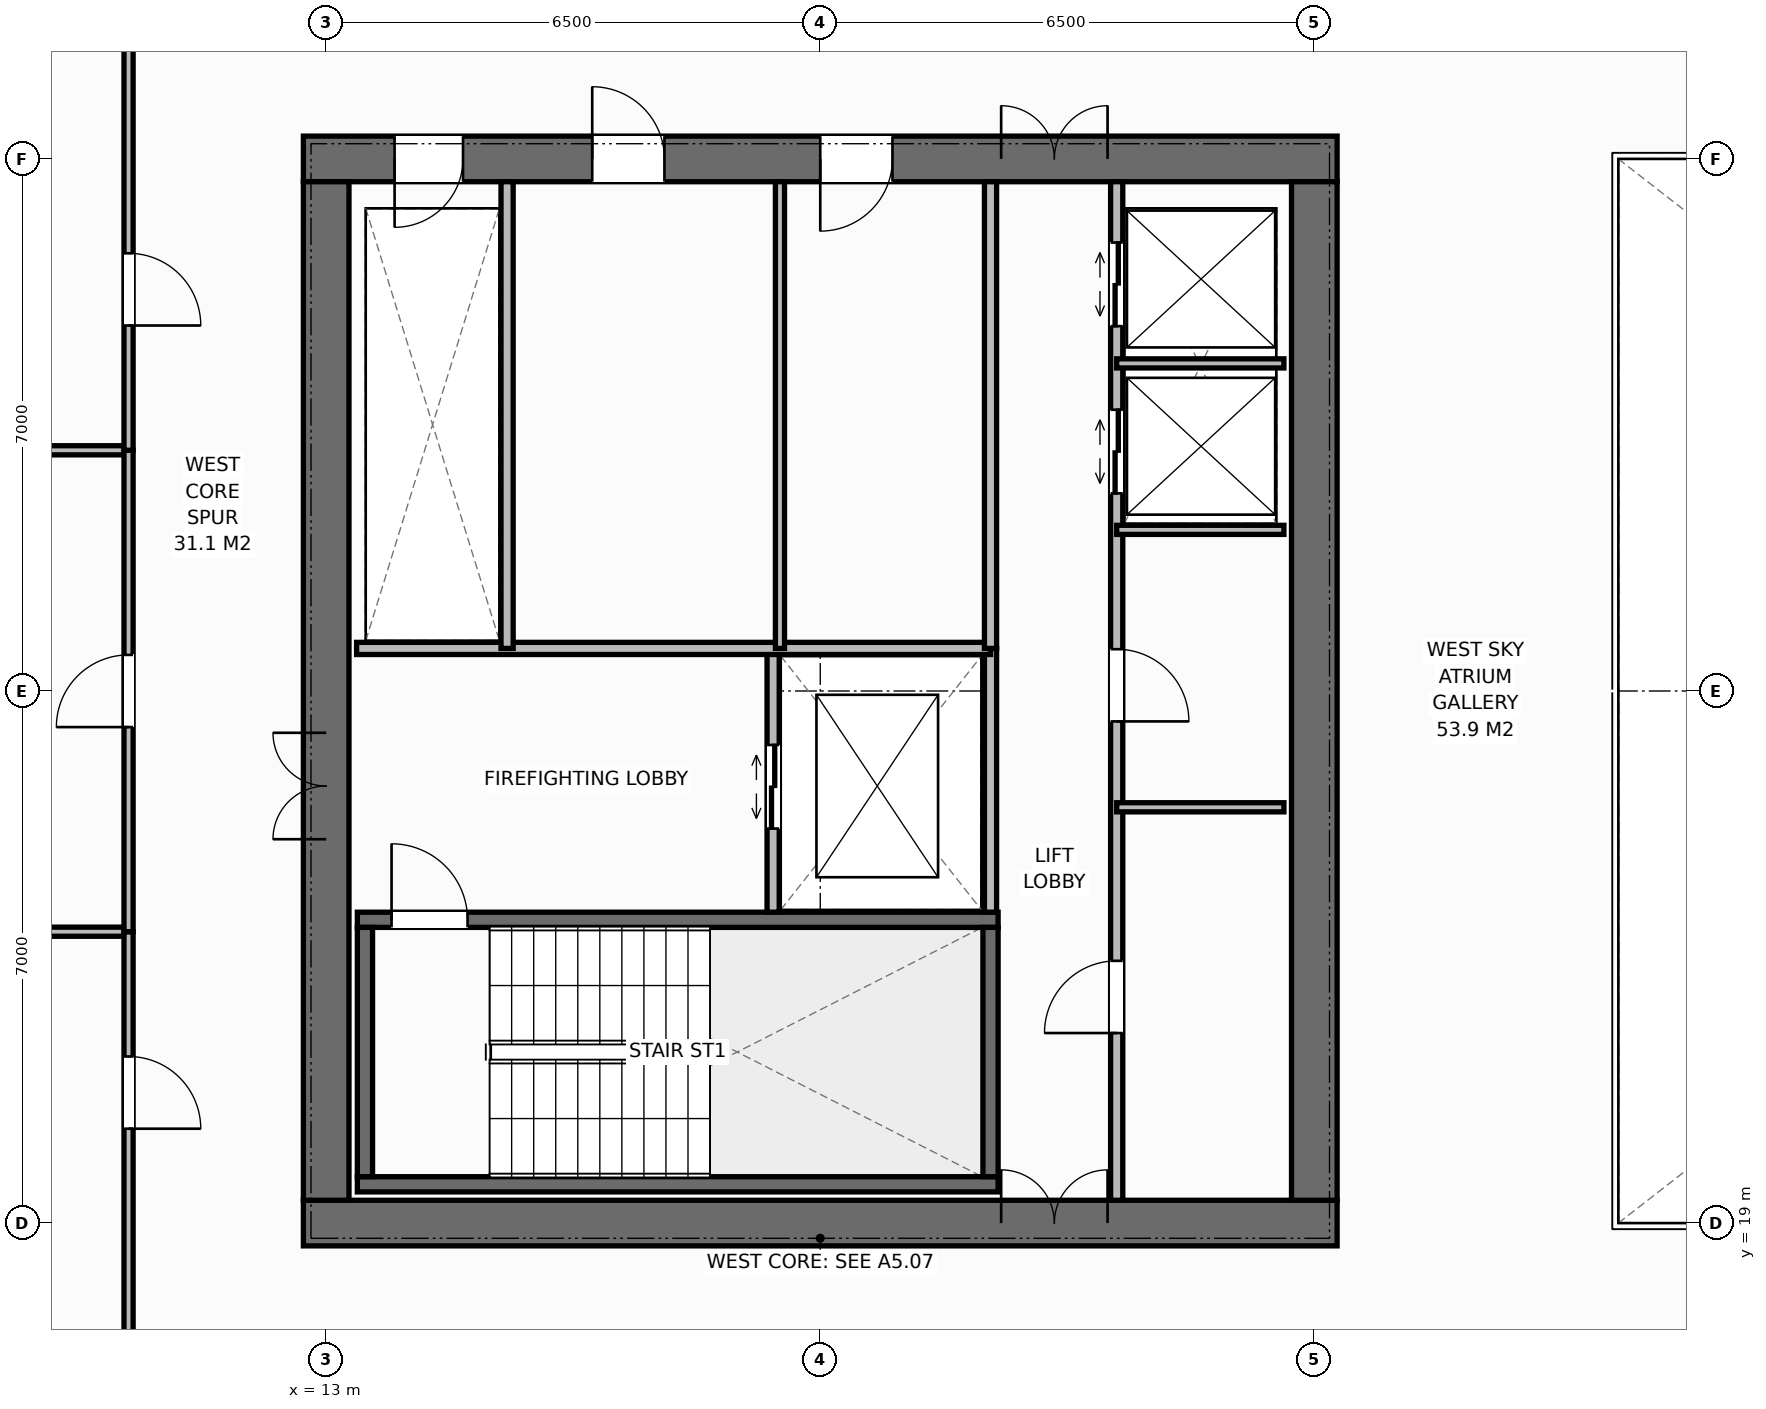
"""IFC4 building model, lengths in metres.
Left out: names, types, materials, properties, quantities, classifications, styles, units other than length and angle.
Written with IfcOpenShell. Run it as: python <this file> out.ifc"""

import sys

from ifc_helpers import new_model, si_unit, direction, frame, frame_2d, origin, place, context, subcontext, project, spatial, rectangle, extrude, element, fill, save


model = new_model("IFC4")
c1 = context("Model", 3, precision=1e-05, world=origin(), true_north=direction((0.0, 1.0)))
c2 = subcontext(c1, "Body", "Model", "MODEL_VIEW")
j1 = project(units=[si_unit("LENGTHUNIT", "METRE"), si_unit("PLANEANGLEUNIT", "RADIAN")], contexts=[c1])
p1 = place(None, origin())
s1 = spatial("IfcSite", under=j1, at=p1, CompositionType="ELEMENT")
p2 = place(p1, origin())
s2 = spatial("IfcBuilding", under=s1, at=p2, CompositionType="ELEMENT")
p3 = place(p2, frame((0.0, 0.0, 193.6)))
s3 = spatial("IfcBuildingStorey", under=s2, at=p3, CompositionType="ELEMENT", Elevation=193.6)
p4 = place(p3, frame((12.7, 19.0, 0.0), z_axis=(0.0, 0.0, 1.0), x_axis=(1.0, 0.0, 0.0)))
e1 = element("IfcWall", 1, at=p4, inside=s3, PredefinedType="SHEAR", context=c2, shape_type="SweptSolid", body=[
    extrude(rectangle(XDim=13.6, YDim=0.6, at=frame_2d((6.8, 0.0))), origin(), (0.0, 0.0, 1.0), 3.8),
])
p5 = place(p4, frame((9.18, 0.0, 0.0)))
e2 = element("IfcOpeningElement", 2, at=p5, cuts=e1, PredefinedType="OPENING", context=c2, shape_type="SweptSolid", body=[
    extrude(rectangle(XDim=1.4, YDim=2.2, at=frame_2d((0.7, 1.1))), frame((0.0, 0.31, 0.0), z_axis=(0.0, -1.0, 0.0), x_axis=(1.0, 0.0, 0.0)), (0.0, 0.0, 1.0), 0.62),
])
p6 = place(p3, frame((12.7, 33.0, 0.0), z_axis=(0.0, 0.0, 1.0), x_axis=(1.0, 0.0, 0.0)))
e3 = element("IfcWall", 3, at=p6, inside=s3, PredefinedType="SHEAR", context=c2, shape_type="SweptSolid", body=[
    extrude(rectangle(XDim=13.6, YDim=0.6, at=frame_2d((6.8, 0.0))), origin(), (0.0, 0.0, 1.0), 3.8),
])
p7 = place(p6, frame((1.2, 0.0, 0.0)))
e4 = element("IfcOpeningElement", 4, at=p7, cuts=e3, PredefinedType="OPENING", context=c2, shape_type="SweptSolid", body=[
    extrude(rectangle(XDim=0.9, YDim=2.15, at=frame_2d((0.45, 1.075))), frame((0.0, 0.31, 0.0), z_axis=(0.0, -1.0, 0.0), x_axis=(1.0, 0.0, 0.0)), (0.0, 0.0, 1.0), 0.62),
])
p8 = place(p6, frame((3.8, 0.0, 0.0)))
e5 = element("IfcOpeningElement", 5, at=p8, cuts=e3, PredefinedType="OPENING", context=c2, shape_type="SweptSolid", body=[
    extrude(rectangle(XDim=0.95, YDim=2.15, at=frame_2d((0.475, 1.075))), frame((0.0, 0.31, 0.0), z_axis=(0.0, -1.0, 0.0), x_axis=(1.0, 0.0, 0.0)), (0.0, 0.0, 1.0), 0.62),
])
p9 = place(p6, frame((6.8, 0.0, 0.0)))
e6 = element("IfcOpeningElement", 6, at=p9, cuts=e3, PredefinedType="OPENING", context=c2, shape_type="SweptSolid", body=[
    extrude(rectangle(XDim=0.95, YDim=2.15, at=frame_2d((0.475, 1.075))), frame((0.0, 0.31, 0.0), z_axis=(0.0, -1.0, 0.0), x_axis=(1.0, 0.0, 0.0)), (0.0, 0.0, 1.0), 0.62),
])
p10 = place(p6, frame((9.18, 0.0, 0.0)))
e7 = element("IfcOpeningElement", 7, at=p10, cuts=e3, PredefinedType="OPENING", context=c2, shape_type="SweptSolid", body=[
    extrude(rectangle(XDim=1.4, YDim=2.2, at=frame_2d((0.7, 1.1))), frame((0.0, 0.31, 0.0), z_axis=(0.0, -1.0, 0.0), x_axis=(1.0, 0.0, 0.0)), (0.0, 0.0, 1.0), 0.62),
])
p11 = place(p3, frame((13.0, 19.3, 0.0), z_axis=(0.0, 0.0, 1.0), x_axis=(0.0, 1.0, 0.0)))
e8 = element("IfcWall", 8, at=p11, inside=s3, PredefinedType="SHEAR", context=c2, shape_type="SweptSolid", body=[
    extrude(rectangle(XDim=13.4, YDim=0.6, at=frame_2d((6.7, 0.0))), origin(), (0.0, 0.0, 1.0), 3.8),
])
p12 = place(p11, frame((4.75, 0.0, 0.0)))
e9 = element("IfcOpeningElement", 9, at=p12, cuts=e8, PredefinedType="OPENING", context=c2, shape_type="SweptSolid", body=[
    extrude(rectangle(XDim=1.4, YDim=2.2, at=frame_2d((0.7, 1.1))), frame((0.0, 0.31, 0.0), z_axis=(0.0, -1.0, 0.0), x_axis=(1.0, 0.0, 0.0)), (0.0, 0.0, 1.0), 0.62),
])
p13 = place(p3, frame((26.0, 19.3, 0.0), z_axis=(0.0, 0.0, 1.0), x_axis=(0.0, 1.0, 0.0)))
e10 = element("IfcWall", 10, at=p13, inside=s3, PredefinedType="SHEAR", context=c2, shape_type="SweptSolid", body=[
    extrude(rectangle(XDim=13.4, YDim=0.6, at=frame_2d((6.7, 0.0))), origin(), (0.0, 0.0, 1.0), 3.8),
])
p14 = place(p3, frame((13.41, 19.51, 0.0), z_axis=(0.0, 0.0, 1.0), x_axis=(1.0, 0.0, 0.0)))
e11 = element("IfcWall", 11, at=p14, inside=s3, PredefinedType="SHEAR", context=c2, shape_type="SweptSolid", body=[
    extrude(rectangle(XDim=8.43, YDim=0.2, at=frame_2d((4.215, 0.0))), origin(), (0.0, 0.0, 1.0), 3.8),
])
p15 = place(p3, frame((13.41, 22.99, 0.0), z_axis=(0.0, 0.0, 1.0), x_axis=(1.0, 0.0, 0.0)))
e12 = element("IfcWall", 12, at=p15, inside=s3, PredefinedType="SHEAR", context=c2, shape_type="SweptSolid", body=[
    extrude(rectangle(XDim=8.43, YDim=0.2, at=frame_2d((4.215, 0.0))), origin(), (0.0, 0.0, 1.0), 3.8),
])
p16 = place(p15, frame((0.45, 0.0, 0.0)))
e13 = element("IfcOpeningElement", 13, at=p16, cuts=e12, PredefinedType="OPENING", context=c2, shape_type="SweptSolid", body=[
    extrude(rectangle(XDim=1.0, YDim=2.15, at=frame_2d((0.5, 1.075))), frame((0.0, 0.11, 0.0), z_axis=(0.0, -1.0, 0.0), x_axis=(1.0, 0.0, 0.0)), (0.0, 0.0, 1.0), 0.22),
])
for number, where, z_axis, x_axis in (
    (14, (13.51, 19.61, 0.0), (0.0, 0.0, 1.0), (0.0, 1.0, 0.0)),
    (15, (21.74, 19.61, 0.0), (0.0, 0.0, 1.0), (0.0, 1.0, 0.0)),
):
    element("IfcWall", number, at=place(p3, frame(where, z_axis=z_axis, x_axis=x_axis)), inside=s3, PredefinedType="SHEAR", context=c2, shape_type="SweptSolid", body=[
        extrude(rectangle(XDim=3.28, YDim=0.2, at=frame_2d((1.64, 0.0))), origin(), (0.0, 0.0, 1.0), 3.8),
    ])
p17 = place(p3, frame((21.74, 23.09, 0.0), z_axis=(0.0, 0.0, 1.0), x_axis=(0.0, 1.0, 0.0)))
e16 = element("IfcWall", 16, at=p17, inside=s3, PredefinedType="STANDARD", context=c2, shape_type="SweptSolid", body=[
    extrude(rectangle(XDim=3.47, YDim=0.16, at=frame_2d((1.735, 0.0))), origin(), (0.0, 0.0, 1.0), 3.52),
])
p18 = place(p3, frame((18.88, 23.09, 0.0), z_axis=(0.0, 0.0, 1.0), x_axis=(0.0, 1.0, 0.0)))
e17 = element("IfcWall", 17, at=p18, inside=s3, PredefinedType="STANDARD", context=c2, shape_type="SweptSolid", body=[
    extrude(rectangle(XDim=3.47, YDim=0.16, at=frame_2d((1.735, 0.0))), origin(), (0.0, 0.0, 1.0), 3.52),
])
p19 = place(p18, frame((1.1, 0.0, 0.0)))
e18 = element("IfcOpeningElement", 18, at=p19, cuts=e17, PredefinedType="OPENING", context=c2, shape_type="SweptSolid", body=[
    extrude(rectangle(XDim=1.1, YDim=2.2, at=frame_2d((0.55, 1.1))), frame((0.0, 0.09, 0.0), z_axis=(0.0, -1.0, 0.0), x_axis=(1.0, 0.0, 0.0)), (0.0, 0.0, 1.0), 0.18),
])
p20 = place(p3, frame((13.4, 26.56, 0.0), z_axis=(0.0, 0.0, 1.0), x_axis=(1.0, 0.0, 0.0)))
e19 = element("IfcWall", 19, at=p20, inside=s3, PredefinedType="STANDARD", context=c2, shape_type="SweptSolid", body=[
    extrude(rectangle(XDim=8.34, YDim=0.16, at=frame_2d((4.17, 0.0))), origin(), (0.0, 0.0, 1.0), 3.52),
])
p21 = place(p3, frame((15.38, 26.56, 0.0), z_axis=(0.0, 0.0, 1.0), x_axis=(0.0, 1.0, 0.0)))
e20 = element("IfcWall", 20, at=p21, inside=s3, PredefinedType="STANDARD", context=c2, shape_type="SweptSolid", body=[
    extrude(rectangle(XDim=6.14, YDim=0.16, at=frame_2d((3.07, 0.0))), origin(), (0.0, 0.0, 1.0), 3.52),
])
p22 = place(p3, frame((18.97, 26.56, 0.0), z_axis=(0.0, 0.0, 1.0), x_axis=(0.0, 1.0, 0.0)))
e21 = element("IfcWall", 21, at=p22, inside=s3, PredefinedType="PARTITIONING", context=c2, shape_type="SweptSolid", body=[
    extrude(rectangle(XDim=6.14, YDim=0.12, at=frame_2d((3.07, 0.0))), origin(), (0.0, 0.0, 1.0), 3.52),
])
p23 = place(p3, frame((21.74, 26.56, 0.0), z_axis=(0.0, 0.0, 1.0), x_axis=(0.0, 1.0, 0.0)))
e22 = element("IfcWall", 22, at=p23, inside=s3, PredefinedType="STANDARD", context=c2, shape_type="SweptSolid", body=[
    extrude(rectangle(XDim=6.14, YDim=0.16, at=frame_2d((3.07, 0.0))), origin(), (0.0, 0.0, 1.0), 3.52),
])
p24 = place(p3, frame((23.4, 19.3, 0.0), z_axis=(0.0, 0.0, 1.0), x_axis=(0.0, 1.0, 0.0)))
e23 = element("IfcWall", 23, at=p24, inside=s3, PredefinedType="STANDARD", context=c2, shape_type="SweptSolid", body=[
    extrude(rectangle(XDim=13.4, YDim=0.16, at=frame_2d((6.7, 0.0))), origin(), (0.0, 0.0, 1.0), 3.52),
])
p25 = place(p24, frame((2.2, 0.0, 0.0)))
e24 = element("IfcOpeningElement", 24, at=p25, cuts=e23, PredefinedType="OPENING", context=c2, shape_type="SweptSolid", body=[
    extrude(rectangle(XDim=0.95, YDim=2.15, at=frame_2d((0.475, 1.075))), frame((0.0, 0.09, 0.0), z_axis=(0.0, -1.0, 0.0), x_axis=(1.0, 0.0, 0.0)), (0.0, 0.0, 1.0), 0.18),
])
p26 = place(p24, frame((6.3, 0.0, 0.0)))
e25 = element("IfcOpeningElement", 25, at=p26, cuts=e23, PredefinedType="OPENING", context=c2, shape_type="SweptSolid", body=[
    extrude(rectangle(XDim=0.95, YDim=2.15, at=frame_2d((0.475, 1.075))), frame((0.0, 0.09, 0.0), z_axis=(0.0, -1.0, 0.0), x_axis=(1.0, 0.0, 0.0)), (0.0, 0.0, 1.0), 0.18),
])
p27 = place(p24, frame((9.3, 0.0, 0.0)))
e26 = element("IfcOpeningElement", 26, at=p27, cuts=e23, PredefinedType="OPENING", context=c2, shape_type="SweptSolid", body=[
    extrude(rectangle(XDim=1.1, YDim=2.2, at=frame_2d((0.55, 1.1))), frame((0.0, 0.09, 0.0), z_axis=(0.0, -1.0, 0.0), x_axis=(1.0, 0.0, 0.0)), (0.0, 0.0, 1.0), 0.18),
])
p28 = place(p24, frame((11.5, 0.0, 0.0)))
e27 = element("IfcOpeningElement", 27, at=p28, cuts=e23, PredefinedType="OPENING", context=c2, shape_type="SweptSolid", body=[
    extrude(rectangle(XDim=1.1, YDim=2.2, at=frame_2d((0.55, 1.1))), frame((0.0, 0.09, 0.0), z_axis=(0.0, -1.0, 0.0), x_axis=(1.0, 0.0, 0.0)), (0.0, 0.0, 1.0), 0.18),
])
for number, where, z_axis, x_axis in (
    (28, (23.4, 24.47, 0.0), (0.0, 0.0, 1.0), (1.0, 0.0, 0.0)),
    (29, (23.4, 28.12, 0.0), (0.0, 0.0, 1.0), (1.0, 0.0, 0.0)),
    (30, (23.4, 30.31, 0.0), (0.0, 0.0, 1.0), (1.0, 0.0, 0.0)),
):
    element("IfcWall", number, at=place(p3, frame(where, z_axis=z_axis, x_axis=x_axis)), inside=s3, PredefinedType="PARTITIONING", context=c2, shape_type="SweptSolid", body=[
        extrude(rectangle(XDim=2.2, YDim=0.12, at=frame_2d((1.1, 0.0))), origin(), (0.0, 0.0, 1.0), 3.52),
    ])
p29 = place(p3, frame((3.82, 22.833, 0.0), z_axis=(0.0, 0.0, 1.0), x_axis=(1.0, 0.0, 0.0)))
e31 = element("IfcWall", 31, at=p29, inside=s3, PredefinedType="PARTITIONING", context=c2, shape_type="SweptSolid", body=[
    extrude(rectangle(XDim=6.58, YDim=0.12, at=frame_2d((3.29, 0.0))), origin(), (0.0, 0.0, 1.0), 3.52),
])
p30 = place(p3, frame((10.4, 16.5, 0.0), z_axis=(0.0, 0.0, 1.0), x_axis=(0.0, 1.0, 0.0)))
e32 = element("IfcWall", 32, at=p30, inside=s3, PredefinedType="PARTITIONING", context=c2, shape_type="SweptSolid", body=[
    extrude(rectangle(XDim=6.333, YDim=0.12, at=frame_2d((3.167, 0.0))), origin(), (0.0, 0.0, 1.0), 3.52),
])
p31 = place(p30, frame((3.742, 0.0, 0.0)))
e33 = element("IfcOpeningElement", 33, at=p31, cuts=e32, PredefinedType="OPENING", context=c2, shape_type="SweptSolid", body=[
    extrude(rectangle(XDim=0.95, YDim=2.15, at=frame_2d((0.475, 1.075))), frame((0.0, 0.07, 0.0), z_axis=(0.0, -1.0, 0.0), x_axis=(1.0, 0.0, 0.0)), (0.0, 0.0, 1.0), 0.14),
])
p32 = place(p3, frame((3.82, 29.167, 0.0), z_axis=(0.0, 0.0, 1.0), x_axis=(1.0, 0.0, 0.0)))
e34 = element("IfcWall", 34, at=p32, inside=s3, PredefinedType="PARTITIONING", context=c2, shape_type="SweptSolid", body=[
    extrude(rectangle(XDim=6.58, YDim=0.12, at=frame_2d((3.29, 0.0))), origin(), (0.0, 0.0, 1.0), 3.52),
])
p33 = place(p3, frame((10.4, 22.833, 0.0), z_axis=(0.0, 0.0, 1.0), x_axis=(0.0, 1.0, 0.0)))
e35 = element("IfcWall", 35, at=p33, inside=s3, PredefinedType="PARTITIONING", context=c2, shape_type="SweptSolid", body=[
    extrude(rectangle(XDim=6.333, YDim=0.12, at=frame_2d((3.167, 0.0))), origin(), (0.0, 0.0, 1.0), 3.52),
])
p34 = place(p33, frame((2.692, 0.0, 0.0)))
e36 = element("IfcOpeningElement", 36, at=p34, cuts=e35, PredefinedType="OPENING", context=c2, shape_type="SweptSolid", body=[
    extrude(rectangle(XDim=0.95, YDim=2.15, at=frame_2d((0.475, 1.075))), frame((0.0, 0.07, 0.0), z_axis=(0.0, -1.0, 0.0), x_axis=(1.0, 0.0, 0.0)), (0.0, 0.0, 1.0), 0.14),
])
p35 = place(p3, frame((10.4, 29.167, 0.0), z_axis=(0.0, 0.0, 1.0), x_axis=(0.0, 1.0, 0.0)))
e37 = element("IfcWall", 37, at=p35, inside=s3, PredefinedType="PARTITIONING", context=c2, shape_type="SweptSolid", body=[
    extrude(rectangle(XDim=6.333, YDim=0.12, at=frame_2d((3.167, 0.0))), origin(), (0.0, 0.0, 1.0), 3.52),
])
p36 = place(p35, frame((1.642, 0.0, 0.0)))
e38 = element("IfcOpeningElement", 38, at=p36, cuts=e37, PredefinedType="OPENING", context=c2, shape_type="SweptSolid", body=[
    extrude(rectangle(XDim=0.95, YDim=2.15, at=frame_2d((0.475, 1.075))), frame((0.0, 0.07, 0.0), z_axis=(0.0, -1.0, 0.0), x_axis=(1.0, 0.0, 0.0)), (0.0, 0.0, 1.0), 0.14),
])
p37 = place(p16, origin())
e39 = element("IfcDoor", 39, at=p37, inside=s3, OperationType="SINGLE_SWING_LEFT", PredefinedType="DOOR", context=c2, shape_type="SweptSolid", body=[
    extrude(rectangle(XDim=1.0, YDim=2.15, at=frame_2d((0.5, 1.075))), frame((0.0, 0.025, 0.0), z_axis=(0.0, -1.0, 0.0), x_axis=(1.0, 0.0, 0.0)), (0.0, 0.0, 1.0), 0.05),
])
fill(e13, e39)
p38 = place(p12, origin())
e40 = element("IfcDoor", 40, at=p38, inside=s3, OperationType="DOUBLE_DOOR_SINGLE_SWING", PredefinedType="DOOR", context=c2, shape_type="SweptSolid", body=[
    extrude(rectangle(XDim=1.4, YDim=2.2, at=frame_2d((0.7, 1.1))), frame((0.0, 0.025, 0.0), z_axis=(0.0, -1.0, 0.0), x_axis=(1.0, 0.0, 0.0)), (0.0, 0.0, 1.0), 0.05),
])
fill(e9, e40)
p39 = place(p19, origin())
e41 = element("IfcDoor", 41, at=p39, inside=s3, OperationType="DOUBLE_DOOR_SLIDING", PredefinedType="DOOR", context=c2, shape_type="SweptSolid", body=[
    extrude(rectangle(XDim=1.1, YDim=2.2, at=frame_2d((0.55, 1.1))), frame((0.0, 0.025, 0.0), z_axis=(0.0, -1.0, 0.0), x_axis=(1.0, 0.0, 0.0)), (0.0, 0.0, 1.0), 0.05),
])
fill(e18, e41)
p40 = place(p7, origin())
e42 = element("IfcDoor", 42, at=p40, inside=s3, OperationType="SINGLE_SWING_RIGHT", PredefinedType="DOOR", context=c2, shape_type="SweptSolid", body=[
    extrude(rectangle(XDim=0.9, YDim=2.15, at=frame_2d((0.45, 1.075))), frame((0.0, -0.025, 0.0), z_axis=(0.0, -1.0, 0.0), x_axis=(1.0, 0.0, 0.0)), (0.0, 0.0, 1.0), 0.05),
])
fill(e4, e42)
p41 = place(p8, origin())
e43 = element("IfcDoor", 43, at=p41, inside=s3, OperationType="SINGLE_SWING_LEFT", PredefinedType="DOOR", context=c2, shape_type="SweptSolid", body=[
    extrude(rectangle(XDim=0.95, YDim=2.15, at=frame_2d((0.475, 1.075))), frame((0.0, -0.025, 0.0), z_axis=(0.0, -1.0, 0.0), x_axis=(1.0, 0.0, 0.0)), (0.0, 0.0, 1.0), 0.05),
])
fill(e5, e43)
p42 = place(p9, origin())
e44 = element("IfcDoor", 44, at=p42, inside=s3, OperationType="SINGLE_SWING_RIGHT", PredefinedType="DOOR", context=c2, shape_type="SweptSolid", body=[
    extrude(rectangle(XDim=0.95, YDim=2.15, at=frame_2d((0.475, 1.075))), frame((0.0, -0.025, 0.0), z_axis=(0.0, -1.0, 0.0), x_axis=(1.0, 0.0, 0.0)), (0.0, 0.0, 1.0), 0.05),
])
fill(e6, e44)
p43 = place(p5, origin())
e45 = element("IfcDoor", 45, at=p43, inside=s3, OperationType="DOUBLE_DOOR_SINGLE_SWING", PredefinedType="DOOR", context=c2, shape_type="SweptSolid", body=[
    extrude(rectangle(XDim=1.4, YDim=2.2, at=frame_2d((0.7, 1.1))), frame((0.0, 0.075, 0.0), z_axis=(0.0, -1.0, 0.0), x_axis=(1.0, 0.0, 0.0)), (0.0, 0.0, 1.0), 0.05),
])
fill(e2, e45)
p44 = place(p10, origin())
e46 = element("IfcDoor", 46, at=p44, inside=s3, OperationType="DOUBLE_DOOR_SINGLE_SWING", PredefinedType="DOOR", context=c2, shape_type="SweptSolid", body=[
    extrude(rectangle(XDim=1.4, YDim=2.2, at=frame_2d((0.7, 1.1))), frame((0.0, -0.025, 0.0), z_axis=(0.0, -1.0, 0.0), x_axis=(1.0, 0.0, 0.0)), (0.0, 0.0, 1.0), 0.05),
])
fill(e7, e46)
p45 = place(p25, origin())
e47 = element("IfcDoor", 47, at=p45, inside=s3, OperationType="SINGLE_SWING_LEFT", PredefinedType="DOOR", context=c2, shape_type="SweptSolid", body=[
    extrude(rectangle(XDim=0.95, YDim=2.15, at=frame_2d((0.475, 1.075))), frame((0.0, 0.025, 0.0), z_axis=(0.0, -1.0, 0.0), x_axis=(1.0, 0.0, 0.0)), (0.0, 0.0, 1.0), 0.05),
])
fill(e24, e47)
p46 = place(p26, origin())
e48 = element("IfcDoor", 48, at=p46, inside=s3, OperationType="SINGLE_SWING_RIGHT", PredefinedType="DOOR", context=c2, shape_type="SweptSolid", body=[
    extrude(rectangle(XDim=0.95, YDim=2.15, at=frame_2d((0.475, 1.075))), frame((0.0, 0.025, 0.0), z_axis=(0.0, -1.0, 0.0), x_axis=(1.0, 0.0, 0.0)), (0.0, 0.0, 1.0), 0.05),
])
fill(e25, e48)
p47 = place(p27, origin())
e49 = element("IfcDoor", 49, at=p47, inside=s3, OperationType="DOUBLE_DOOR_SLIDING", PredefinedType="DOOR", context=c2, shape_type="SweptSolid", body=[
    extrude(rectangle(XDim=1.1, YDim=2.2, at=frame_2d((0.55, 1.1))), frame((0.0, 0.025, 0.0), z_axis=(0.0, -1.0, 0.0), x_axis=(1.0, 0.0, 0.0)), (0.0, 0.0, 1.0), 0.05),
])
fill(e26, e49)
p48 = place(p28, origin())
e50 = element("IfcDoor", 50, at=p48, inside=s3, OperationType="DOUBLE_DOOR_SLIDING", PredefinedType="DOOR", context=c2, shape_type="SweptSolid", body=[
    extrude(rectangle(XDim=1.1, YDim=2.2, at=frame_2d((0.55, 1.1))), frame((0.0, 0.025, 0.0), z_axis=(0.0, -1.0, 0.0), x_axis=(1.0, 0.0, 0.0)), (0.0, 0.0, 1.0), 0.05),
])
fill(e27, e50)
p49 = place(p31, origin())
e51 = element("IfcDoor", 51, at=p49, inside=s3, OperationType="SINGLE_SWING_RIGHT", PredefinedType="DOOR", context=c2, shape_type="SweptSolid", body=[
    extrude(rectangle(XDim=0.95, YDim=2.15, at=frame_2d((0.475, 1.075))), frame((0.0, 0.025, 0.0), z_axis=(0.0, -1.0, 0.0), x_axis=(1.0, 0.0, 0.0)), (0.0, 0.0, 1.0), 0.05),
])
fill(e33, e51)
p50 = place(p34, origin())
e52 = element("IfcDoor", 52, at=p50, inside=s3, OperationType="SINGLE_SWING_LEFT", PredefinedType="DOOR", context=c2, shape_type="SweptSolid", body=[
    extrude(rectangle(XDim=0.95, YDim=2.15, at=frame_2d((0.475, 1.075))), frame((0.0, 0.025, 0.0), z_axis=(0.0, -1.0, 0.0), x_axis=(1.0, 0.0, 0.0)), (0.0, 0.0, 1.0), 0.05),
])
fill(e36, e52)
p51 = place(p36, origin())
e53 = element("IfcDoor", 53, at=p51, inside=s3, OperationType="SINGLE_SWING_RIGHT", PredefinedType="DOOR", context=c2, shape_type="SweptSolid", body=[
    extrude(rectangle(XDim=0.95, YDim=2.15, at=frame_2d((0.475, 1.075))), frame((0.0, 0.025, 0.0), z_axis=(0.0, -1.0, 0.0), x_axis=(1.0, 0.0, 0.0)), (0.0, 0.0, 1.0), 0.05),
])
fill(e38, e53)
save(model, sys.argv[1])
